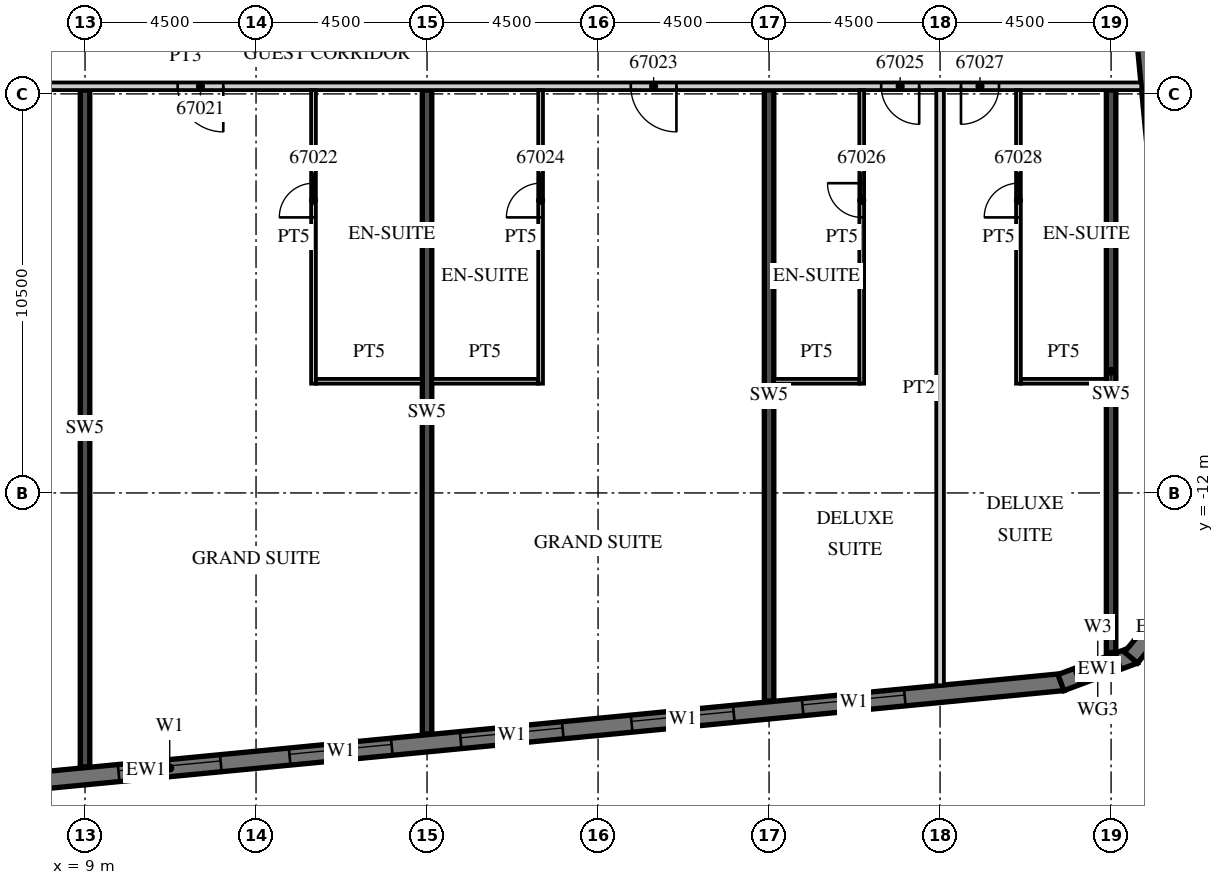
"""IFC4 building model, lengths in metres.
Left out: names, types, materials, properties, quantities, classifications, styles, units other than length and angle.
Written with IfcOpenShell. Run it as: python <this file> out.ifc"""

import sys

from ifc_helpers import new_model, si_unit, direction, frame, frame_2d, origin, place, context, subcontext, project, spatial, polyline, rectangle, outline, extrude, element, fill, save


model = new_model("IFC4")
c1 = context("Model", 3, precision=1e-05, world=origin(), true_north=direction((0.0, 1.0)))
c2 = subcontext(c1, "Body", "Model", "MODEL_VIEW")
j1 = project(units=[si_unit("LENGTHUNIT", "METRE"), si_unit("PLANEANGLEUNIT", "RADIAN")], contexts=[c1])
p1 = place(None, origin())
s1 = spatial("IfcSite", under=j1, at=p1, CompositionType="ELEMENT")
p2 = place(p1, origin())
s2 = spatial("IfcBuilding", under=s1, at=p2, CompositionType="ELEMENT")
p3 = place(p2, frame((0.0, 0.0, 271.8)))
s3 = spatial("IfcBuildingStorey", under=s2, at=p3, CompositionType="ELEMENT", Elevation=271.8)
p4 = place(p3, frame((9.0, -19.207, 0.0), z_axis=(0.0, 0.0, 1.0), x_axis=(0.0, 1.0, 0.0)))
e1 = element("IfcWall", 1, at=p4, inside=s3, PredefinedType="SHEAR", context=c2, shape_type="SweptSolid", body=[
    extrude(rectangle(XDim=17.807, YDim=0.25, at=frame_2d((8.904, 0.0))), origin(), (0.0, 0.0, 1.0), 3.3),
])
p5 = place(p3, frame((18.0, -18.341, 0.0), z_axis=(0.0, 0.0, 1.0), x_axis=(0.0, 1.0, 0.0)))
e2 = element("IfcWall", 2, at=p5, inside=s3, PredefinedType="SHEAR", context=c2, shape_type="SweptSolid", body=[
    extrude(rectangle(XDim=16.941, YDim=0.25, at=frame_2d((8.47, 0.0))), origin(), (0.0, 0.0, 1.0), 3.3),
])
p6 = place(p3, frame((27.0, -17.474, 0.0), z_axis=(0.0, 0.0, 1.0), x_axis=(0.0, 1.0, 0.0)))
e3 = element("IfcWall", 3, at=p6, inside=s3, PredefinedType="SHEAR", context=c2, shape_type="SweptSolid", body=[
    extrude(rectangle(XDim=16.074, YDim=0.25, at=frame_2d((8.037, 0.0))), origin(), (0.0, 0.0, 1.0), 3.3),
])
p7 = place(p3, frame((36.0, -16.199, 0.0), z_axis=(0.0, 0.0, 1.0), x_axis=(0.0, 1.0, 0.0)))
e4 = element("IfcWall", 4, at=p7, inside=s3, PredefinedType="SHEAR", context=c2, shape_type="SweptSolid", body=[
    extrude(rectangle(XDim=14.799, YDim=0.25, at=frame_2d((7.399, 0.0))), origin(), (0.0, 0.0, 1.0), 3.3),
])
p8 = place(p3, frame((-13.521, -21.624, 0.0), z_axis=(0.0, 0.0, 1.0), x_axis=(0.995396186218, 0.095845878695, 0.0)))
e5 = element("IfcWall", 5, at=p8, inside=s3, PredefinedType="SOLIDWALL", context=c2, shape_type="SweptSolid", body=[
    extrude(rectangle(XDim=48.481, YDim=0.45, at=frame_2d((24.241, 0.0))), origin(), (0.0, 0.0, 1.0), 3.02),
])
p9 = place(p8, frame((0.91, 0.0, 0.45)))
e6 = element("IfcOpeningElement", 6, at=p9, cuts=e5, PredefinedType="OPENING", context=c2, shape_type="SweptSolid", body=[
    extrude(rectangle(XDim=2.7, YDim=2.25, at=frame_2d((1.35, 1.125))), frame((0.0, 0.235, 0.0), z_axis=(0.0, -1.0, 0.0), x_axis=(1.0, 0.0, 0.0)), (0.0, 0.0, 1.0), 0.47),
])
p10 = place(p8, frame((5.431, 0.0, 0.45)))
e7 = element("IfcOpeningElement", 7, at=p10, cuts=e5, PredefinedType="OPENING", context=c2, shape_type="SweptSolid", body=[
    extrude(rectangle(XDim=2.7, YDim=2.25, at=frame_2d((1.35, 1.125))), frame((0.0, 0.235, 0.0), z_axis=(0.0, -1.0, 0.0), x_axis=(1.0, 0.0, 0.0)), (0.0, 0.0, 1.0), 0.47),
])
p11 = place(p8, frame((9.952, 0.0, 0.45)))
e8 = element("IfcOpeningElement", 8, at=p11, cuts=e5, PredefinedType="OPENING", context=c2, shape_type="SweptSolid", body=[
    extrude(rectangle(XDim=2.7, YDim=2.25, at=frame_2d((1.35, 1.125))), frame((0.0, 0.235, 0.0), z_axis=(0.0, -1.0, 0.0), x_axis=(1.0, 0.0, 0.0)), (0.0, 0.0, 1.0), 0.47),
])
p12 = place(p8, frame((14.473, 0.0, 0.45)))
e9 = element("IfcOpeningElement", 9, at=p12, cuts=e5, PredefinedType="OPENING", context=c2, shape_type="SweptSolid", body=[
    extrude(rectangle(XDim=2.7, YDim=2.25, at=frame_2d((1.35, 1.125))), frame((0.0, 0.235, 0.0), z_axis=(0.0, -1.0, 0.0), x_axis=(1.0, 0.0, 0.0)), (0.0, 0.0, 1.0), 0.47),
])
p13 = place(p8, frame((18.994, 0.0, 0.45)))
e10 = element("IfcOpeningElement", 10, at=p13, cuts=e5, PredefinedType="OPENING", context=c2, shape_type="SweptSolid", body=[
    extrude(rectangle(XDim=2.7, YDim=2.25, at=frame_2d((1.35, 1.125))), frame((0.0, 0.235, 0.0), z_axis=(0.0, -1.0, 0.0), x_axis=(1.0, 0.0, 0.0)), (0.0, 0.0, 1.0), 0.47),
])
p14 = place(p8, frame((23.514, 0.0, 0.45)))
e11 = element("IfcOpeningElement", 11, at=p14, cuts=e5, PredefinedType="OPENING", context=c2, shape_type="SweptSolid", body=[
    extrude(rectangle(XDim=2.7, YDim=2.25, at=frame_2d((1.35, 1.125))), frame((0.0, 0.235, 0.0), z_axis=(0.0, -1.0, 0.0), x_axis=(1.0, 0.0, 0.0)), (0.0, 0.0, 1.0), 0.47),
])
p15 = place(p8, frame((28.035, 0.0, 0.45)))
e12 = element("IfcOpeningElement", 12, at=p15, cuts=e5, PredefinedType="OPENING", context=c2, shape_type="SweptSolid", body=[
    extrude(rectangle(XDim=2.7, YDim=2.25, at=frame_2d((1.35, 1.125))), frame((0.0, 0.235, 0.0), z_axis=(0.0, -1.0, 0.0), x_axis=(1.0, 0.0, 0.0)), (0.0, 0.0, 1.0), 0.47),
])
p16 = place(p8, frame((32.556, 0.0, 0.45)))
e13 = element("IfcOpeningElement", 13, at=p16, cuts=e5, PredefinedType="OPENING", context=c2, shape_type="SweptSolid", body=[
    extrude(rectangle(XDim=2.7, YDim=2.25, at=frame_2d((1.35, 1.125))), frame((0.0, 0.235, 0.0), z_axis=(0.0, -1.0, 0.0), x_axis=(1.0, 0.0, 0.0)), (0.0, 0.0, 1.0), 0.47),
])
p17 = place(p8, frame((37.077, 0.0, 0.45)))
e14 = element("IfcOpeningElement", 14, at=p17, cuts=e5, PredefinedType="OPENING", context=c2, shape_type="SweptSolid", body=[
    extrude(rectangle(XDim=2.7, YDim=2.25, at=frame_2d((1.35, 1.125))), frame((0.0, 0.235, 0.0), z_axis=(0.0, -1.0, 0.0), x_axis=(1.0, 0.0, 0.0)), (0.0, 0.0, 1.0), 0.47),
])
p18 = place(p8, frame((41.598, 0.0, 0.45)))
e15 = element("IfcOpeningElement", 15, at=p18, cuts=e5, PredefinedType="OPENING", context=c2, shape_type="SweptSolid", body=[
    extrude(rectangle(XDim=2.7, YDim=2.25, at=frame_2d((1.35, 1.125))), frame((0.0, 0.235, 0.0), z_axis=(0.0, -1.0, 0.0), x_axis=(1.0, 0.0, 0.0)), (0.0, 0.0, 1.0), 0.47),
])
p19 = place(p3, frame((34.679, -16.99, 0.0), z_axis=(0.0, 0.0, 1.0), x_axis=(0.936677599948, 0.350192909346, 0.0)))
e16 = element("IfcWall", 16, at=p19, inside=s3, PredefinedType="SOLIDWALL", context=c2, shape_type="SweptSolid", body=[
    extrude(outline(polyline([(0.0, -0.225), (2.071, -0.225), (1.95, 0.225), (0.121, 0.225), (0.0, -0.225)])), origin(), (0.0, 0.0, 1.0), 3.02),
])
p20 = place(p19, frame((0.435, 0.0, 0.45)))
e17 = element("IfcOpeningElement", 17, at=p20, cuts=e16, PredefinedType="OPENING", context=c2, shape_type="SweptSolid", body=[
    extrude(rectangle(XDim=1.2, YDim=2.25, at=frame_2d((0.6, 1.125))), frame((0.0, 0.235, 0.0), z_axis=(0.0, -1.0, 0.0), x_axis=(1.0, 0.0, 0.0)), (0.0, 0.0, 1.0), 0.47),
])
p21 = place(p3, frame((36.524, -16.333, 0.0), z_axis=(0.0, 0.0, 1.0), x_axis=(0.636046112757, 0.771651049663, 0.0)))
e18 = element("IfcWall", 18, at=p21, inside=s3, PredefinedType="SOLIDWALL", context=c2, shape_type="SweptSolid", body=[
    extrude(outline(polyline([(0.0, -0.225), (2.071, -0.225), (1.95, 0.225), (0.121, 0.225), (0.0, -0.225)])), origin(), (0.0, 0.0, 1.0), 3.02),
])
p22 = place(p3, frame((38.132, -12.858, 0.0), z_axis=(0.0, 0.0, 1.0), x_axis=(-0.095847749461, 0.995396006082, 0.0)))
e19 = element("IfcWall", 19, at=p22, inside=s3, PredefinedType="SOLIDWALL", context=c2, shape_type="SweptSolid", body=[
    extrude(rectangle(XDim=32.0, YDim=0.45, at=frame_2d((16.0, 0.0))), origin(), (0.0, 0.0, 1.0), 3.02),
])
p23 = place(p3, frame((-13.5, -1.3, 0.0), z_axis=(0.0, 0.0, 1.0), x_axis=(1.0, 0.0, 0.0)))
e20 = element("IfcWall", 20, at=p23, inside=s3, PredefinedType="PARTITIONING", context=c2, shape_type="SweptSolid", body=[
    extrude(rectangle(XDim=50.293, YDim=0.2, at=frame_2d((25.146, 0.0))), origin(), (0.0, 0.0, 1.0), 3.02),
])
p24 = place(p23, frame((0.575, 0.0, 0.0)))
e21 = element("IfcOpeningElement", 21, at=p24, cuts=e20, PredefinedType="OPENING", context=c2, shape_type="SweptSolid", body=[
    extrude(rectangle(XDim=1.0, YDim=2.1, at=frame_2d((0.5, 1.05))), frame((0.0, 0.11, 0.0), z_axis=(0.0, -1.0, 0.0), x_axis=(1.0, 0.0, 0.0)), (0.0, 0.0, 1.0), 0.22),
])
p25 = place(p23, frame((6.938, 0.0, 0.0)))
e22 = element("IfcOpeningElement", 22, at=p25, cuts=e20, PredefinedType="OPENING", context=c2, shape_type="SweptSolid", body=[
    extrude(rectangle(XDim=1.2, YDim=2.1, at=frame_2d((0.6, 1.05))), frame((0.0, 0.11, 0.0), z_axis=(0.0, -1.0, 0.0), x_axis=(1.0, 0.0, 0.0)), (0.0, 0.0, 1.0), 0.22),
])
p26 = place(p23, frame((18.862, 0.0, 0.0)))
e23 = element("IfcOpeningElement", 23, at=p26, cuts=e20, PredefinedType="OPENING", context=c2, shape_type="SweptSolid", body=[
    extrude(rectangle(XDim=1.2, YDim=2.1, at=frame_2d((0.6, 1.05))), frame((0.0, 0.11, 0.0), z_axis=(0.0, -1.0, 0.0), x_axis=(1.0, 0.0, 0.0)), (0.0, 0.0, 1.0), 0.22),
])
p27 = place(p23, frame((24.938, 0.0, 0.0)))
e24 = element("IfcOpeningElement", 24, at=p27, cuts=e20, PredefinedType="OPENING", context=c2, shape_type="SweptSolid", body=[
    extrude(rectangle(XDim=1.2, YDim=2.1, at=frame_2d((0.6, 1.05))), frame((0.0, 0.11, 0.0), z_axis=(0.0, -1.0, 0.0), x_axis=(1.0, 0.0, 0.0)), (0.0, 0.0, 1.0), 0.22),
])
p28 = place(p23, frame((36.862, 0.0, 0.0)))
e25 = element("IfcOpeningElement", 25, at=p28, cuts=e20, PredefinedType="OPENING", context=c2, shape_type="SweptSolid", body=[
    extrude(rectangle(XDim=1.2, YDim=2.1, at=frame_2d((0.6, 1.05))), frame((0.0, 0.11, 0.0), z_axis=(0.0, -1.0, 0.0), x_axis=(1.0, 0.0, 0.0)), (0.0, 0.0, 1.0), 0.22),
])
p29 = place(p23, frame((43.45, 0.0, 0.0)))
e26 = element("IfcOpeningElement", 26, at=p29, cuts=e20, PredefinedType="OPENING", context=c2, shape_type="SweptSolid", body=[
    extrude(rectangle(XDim=1.0, YDim=2.1, at=frame_2d((0.5, 1.05))), frame((0.0, 0.11, 0.0), z_axis=(0.0, -1.0, 0.0), x_axis=(1.0, 0.0, 0.0)), (0.0, 0.0, 1.0), 0.22),
])
p30 = place(p23, frame((45.55, 0.0, 0.0)))
e27 = element("IfcOpeningElement", 27, at=p30, cuts=e20, PredefinedType="OPENING", context=c2, shape_type="SweptSolid", body=[
    extrude(rectangle(XDim=1.0, YDim=2.1, at=frame_2d((0.5, 1.05))), frame((0.0, 0.11, 0.0), z_axis=(0.0, -1.0, 0.0), x_axis=(1.0, 0.0, 0.0)), (0.0, 0.0, 1.0), 0.22),
])
p31 = place(p3, frame((15.012, -9.125, 0.0), z_axis=(0.0, 0.0, 1.0), x_axis=(0.0, 1.0, 0.0)))
e28 = element("IfcWall", 28, at=p31, inside=s3, PredefinedType="PARTITIONING", context=c2, shape_type="SweptSolid", body=[
    extrude(rectangle(XDim=7.725, YDim=0.125, at=frame_2d((3.863, 0.0))), origin(), (0.0, 0.0, 1.0), 3.02),
])
p32 = place(p31, frame((4.375, 0.0, 0.0)))
e29 = element("IfcOpeningElement", 29, at=p32, cuts=e28, PredefinedType="OPENING", context=c2, shape_type="SweptSolid", body=[
    extrude(rectangle(XDim=0.9, YDim=2.1, at=frame_2d((0.45, 1.05))), frame((0.0, 0.073, 0.0), z_axis=(0.0, -1.0, 0.0), x_axis=(1.0, 0.0, 0.0)), (0.0, 0.0, 1.0), 0.145),
])
p33 = place(p3, frame((15.075, -9.062, 0.0), z_axis=(0.0, 0.0, 1.0), x_axis=(1.0, 0.0, 0.0)))
e30 = element("IfcWall", 30, at=p33, inside=s3, PredefinedType="PARTITIONING", context=c2, shape_type="SweptSolid", body=[
    extrude(rectangle(XDim=2.8, YDim=0.125, at=frame_2d((1.4, 0.0))), origin(), (0.0, 0.0, 1.0), 3.02),
])
p34 = place(p3, frame((20.988, -9.125, 0.0), z_axis=(0.0, 0.0, 1.0), x_axis=(0.0, 1.0, 0.0)))
e31 = element("IfcWall", 31, at=p34, inside=s3, PredefinedType="PARTITIONING", context=c2, shape_type="SweptSolid", body=[
    extrude(rectangle(XDim=7.725, YDim=0.125, at=frame_2d((3.863, 0.0))), origin(), (0.0, 0.0, 1.0), 3.02),
])
p35 = place(p34, frame((4.375, 0.0, 0.0)))
e32 = element("IfcOpeningElement", 32, at=p35, cuts=e31, PredefinedType="OPENING", context=c2, shape_type="SweptSolid", body=[
    extrude(rectangle(XDim=0.9, YDim=2.1, at=frame_2d((0.45, 1.05))), frame((0.0, 0.073, 0.0), z_axis=(0.0, -1.0, 0.0), x_axis=(1.0, 0.0, 0.0)), (0.0, 0.0, 1.0), 0.145),
])
p36 = place(p3, frame((18.125, -9.062, 0.0), z_axis=(0.0, 0.0, 1.0), x_axis=(1.0, 0.0, 0.0)))
e33 = element("IfcWall", 33, at=p36, inside=s3, PredefinedType="PARTITIONING", context=c2, shape_type="SweptSolid", body=[
    extrude(rectangle(XDim=2.8, YDim=0.125, at=frame_2d((1.4, 0.0))), origin(), (0.0, 0.0, 1.0), 3.02),
])
p37 = place(p3, frame((31.5, -17.063, 0.0), z_axis=(0.0, 0.0, 1.0), x_axis=(0.0, 1.0, 0.0)))
e34 = element("IfcWall", 34, at=p37, inside=s3, PredefinedType="PARTITIONING", context=c2, shape_type="SweptSolid", body=[
    extrude(rectangle(XDim=15.663, YDim=0.2, at=frame_2d((7.832, 0.0))), origin(), (0.0, 0.0, 1.0), 3.02),
])
p38 = place(p3, frame((29.438, -9.125, 0.0), z_axis=(0.0, 0.0, 1.0), x_axis=(0.0, 1.0, 0.0)))
e35 = element("IfcWall", 35, at=p38, inside=s3, PredefinedType="PARTITIONING", context=c2, shape_type="SweptSolid", body=[
    extrude(rectangle(XDim=7.725, YDim=0.125, at=frame_2d((3.863, 0.0))), origin(), (0.0, 0.0, 1.0), 3.02),
])
p39 = place(p38, frame((4.375, 0.0, 0.0)))
e36 = element("IfcOpeningElement", 36, at=p39, cuts=e35, PredefinedType="OPENING", context=c2, shape_type="SweptSolid", body=[
    extrude(rectangle(XDim=0.9, YDim=2.1, at=frame_2d((0.45, 1.05))), frame((0.0, 0.073, 0.0), z_axis=(0.0, -1.0, 0.0), x_axis=(1.0, 0.0, 0.0)), (0.0, 0.0, 1.0), 0.145),
])
p40 = place(p3, frame((27.125, -9.062, 0.0), z_axis=(0.0, 0.0, 1.0), x_axis=(1.0, 0.0, 0.0)))
e37 = element("IfcWall", 37, at=p40, inside=s3, PredefinedType="PARTITIONING", context=c2, shape_type="SweptSolid", body=[
    extrude(rectangle(XDim=2.25, YDim=0.125, at=frame_2d((1.125, 0.0))), origin(), (0.0, 0.0, 1.0), 3.02),
])
p41 = place(p3, frame((33.562, -9.125, 0.0), z_axis=(0.0, 0.0, 1.0), x_axis=(0.0, 1.0, 0.0)))
e38 = element("IfcWall", 38, at=p41, inside=s3, PredefinedType="PARTITIONING", context=c2, shape_type="SweptSolid", body=[
    extrude(rectangle(XDim=7.725, YDim=0.125, at=frame_2d((3.863, 0.0))), origin(), (0.0, 0.0, 1.0), 3.02),
])
p42 = place(p41, frame((4.375, 0.0, 0.0)))
e39 = element("IfcOpeningElement", 39, at=p42, cuts=e38, PredefinedType="OPENING", context=c2, shape_type="SweptSolid", body=[
    extrude(rectangle(XDim=0.9, YDim=2.1, at=frame_2d((0.45, 1.05))), frame((0.0, 0.073, 0.0), z_axis=(0.0, -1.0, 0.0), x_axis=(1.0, 0.0, 0.0)), (0.0, 0.0, 1.0), 0.145),
])
p43 = place(p3, frame((33.625, -9.062, 0.0), z_axis=(0.0, 0.0, 1.0), x_axis=(1.0, 0.0, 0.0)))
e40 = element("IfcWall", 40, at=p43, inside=s3, PredefinedType="PARTITIONING", context=c2, shape_type="SweptSolid", body=[
    extrude(rectangle(XDim=2.25, YDim=0.125, at=frame_2d((1.125, 0.0))), origin(), (0.0, 0.0, 1.0), 3.02),
])
p44 = place(p14, origin())
e41 = element("IfcWindow", 41, at=p44, inside=s3, PartitioningType="SINGLE_PANEL", PredefinedType="WINDOW", context=c2, shape_type="SweptSolid", body=[
    extrude(rectangle(XDim=2.7, YDim=2.25, at=frame_2d((1.35, 1.125))), frame((0.0, 0.09, 0.0), z_axis=(0.0, -1.0, 0.0), x_axis=(1.0, 0.0, 0.0)), (0.0, 0.0, 1.0), 0.06),
])
fill(e11, e41)
p45 = place(p15, origin())
e42 = element("IfcWindow", 42, at=p45, inside=s3, PartitioningType="SINGLE_PANEL", PredefinedType="WINDOW", context=c2, shape_type="SweptSolid", body=[
    extrude(rectangle(XDim=2.7, YDim=2.25, at=frame_2d((1.35, 1.125))), frame((0.0, 0.09, 0.0), z_axis=(0.0, -1.0, 0.0), x_axis=(1.0, 0.0, 0.0)), (0.0, 0.0, 1.0), 0.06),
])
fill(e12, e42)
p46 = place(p16, origin())
e43 = element("IfcWindow", 43, at=p46, inside=s3, PartitioningType="SINGLE_PANEL", PredefinedType="WINDOW", context=c2, shape_type="SweptSolid", body=[
    extrude(rectangle(XDim=2.7, YDim=2.25, at=frame_2d((1.35, 1.125))), frame((0.0, 0.09, 0.0), z_axis=(0.0, -1.0, 0.0), x_axis=(1.0, 0.0, 0.0)), (0.0, 0.0, 1.0), 0.06),
])
fill(e13, e43)
p47 = place(p17, origin())
e44 = element("IfcWindow", 44, at=p47, inside=s3, PartitioningType="SINGLE_PANEL", PredefinedType="WINDOW", context=c2, shape_type="SweptSolid", body=[
    extrude(rectangle(XDim=2.7, YDim=2.25, at=frame_2d((1.35, 1.125))), frame((0.0, 0.09, 0.0), z_axis=(0.0, -1.0, 0.0), x_axis=(1.0, 0.0, 0.0)), (0.0, 0.0, 1.0), 0.06),
])
fill(e14, e44)
p48 = place(p18, origin())
e45 = element("IfcWindow", 45, at=p48, inside=s3, PartitioningType="SINGLE_PANEL", PredefinedType="WINDOW", context=c2, shape_type="SweptSolid", body=[
    extrude(rectangle(XDim=2.7, YDim=2.25, at=frame_2d((1.35, 1.125))), frame((0.0, 0.09, 0.0), z_axis=(0.0, -1.0, 0.0), x_axis=(1.0, 0.0, 0.0)), (0.0, 0.0, 1.0), 0.06),
])
fill(e15, e45)
p49 = place(p20, origin())
e46 = element("IfcWindow", 46, at=p49, inside=s3, PartitioningType="SINGLE_PANEL", PredefinedType="WINDOW", context=c2, shape_type="SweptSolid", body=[
    extrude(rectangle(XDim=1.2, YDim=2.25, at=frame_2d((0.6, 1.125))), frame((0.0, 0.09, 0.0), z_axis=(0.0, -1.0, 0.0), x_axis=(1.0, 0.0, 0.0)), (0.0, 0.0, 1.0), 0.06),
])
fill(e17, e46)
p50 = place(p27, origin())
e47 = element("IfcDoor", 47, at=p50, inside=s3, OperationType="SINGLE_SWING_RIGHT", PredefinedType="DOOR", context=c2, shape_type="SweptSolid", body=[
    extrude(rectangle(XDim=1.2, YDim=2.1, at=frame_2d((0.6, 1.05))), frame((0.0, 0.025, 0.0), z_axis=(0.0, -1.0, 0.0), x_axis=(1.0, 0.0, 0.0)), (0.0, 0.0, 1.0), 0.05),
])
fill(e24, e47)
p51 = place(p32, origin())
e48 = element("IfcDoor", 48, at=p51, inside=s3, OperationType="SINGLE_SWING_LEFT", PredefinedType="DOOR", context=c2, shape_type="SweptSolid", body=[
    extrude(rectangle(XDim=0.9, YDim=2.1, at=frame_2d((0.45, 1.05))), frame((0.0, 0.025, 0.0), z_axis=(0.0, -1.0, 0.0), x_axis=(1.0, 0.0, 0.0)), (0.0, 0.0, 1.0), 0.05),
])
fill(e29, e48)
p52 = place(p28, origin())
e49 = element("IfcDoor", 49, at=p52, inside=s3, OperationType="SINGLE_SWING_RIGHT", PredefinedType="DOOR", context=c2, shape_type="SweptSolid", body=[
    extrude(rectangle(XDim=1.2, YDim=2.1, at=frame_2d((0.6, 1.05))), frame((0.0, 0.025, 0.0), z_axis=(0.0, -1.0, 0.0), x_axis=(1.0, 0.0, 0.0)), (0.0, 0.0, 1.0), 0.05),
])
fill(e25, e49)
p53 = place(p35, origin())
e50 = element("IfcDoor", 50, at=p53, inside=s3, OperationType="SINGLE_SWING_LEFT", PredefinedType="DOOR", context=c2, shape_type="SweptSolid", body=[
    extrude(rectangle(XDim=0.9, YDim=2.1, at=frame_2d((0.45, 1.05))), frame((0.0, 0.025, 0.0), z_axis=(0.0, -1.0, 0.0), x_axis=(1.0, 0.0, 0.0)), (0.0, 0.0, 1.0), 0.05),
])
fill(e32, e50)
p54 = place(p29, origin())
e51 = element("IfcDoor", 51, at=p54, inside=s3, OperationType="SINGLE_SWING_RIGHT", PredefinedType="DOOR", context=c2, shape_type="SweptSolid", body=[
    extrude(rectangle(XDim=1.0, YDim=2.1, at=frame_2d((0.5, 1.05))), frame((0.0, 0.025, 0.0), z_axis=(0.0, -1.0, 0.0), x_axis=(1.0, 0.0, 0.0)), (0.0, 0.0, 1.0), 0.05),
])
fill(e26, e51)
p55 = place(p39, origin())
e52 = element("IfcDoor", 52, at=p55, inside=s3, OperationType="SINGLE_SWING_RIGHT", PredefinedType="DOOR", context=c2, shape_type="SweptSolid", body=[
    extrude(rectangle(XDim=0.9, YDim=2.1, at=frame_2d((0.45, 1.05))), frame((0.0, 0.025, 0.0), z_axis=(0.0, -1.0, 0.0), x_axis=(1.0, 0.0, 0.0)), (0.0, 0.0, 1.0), 0.05),
])
fill(e36, e52)
p56 = place(p30, origin())
e53 = element("IfcDoor", 53, at=p56, inside=s3, OperationType="SINGLE_SWING_LEFT", PredefinedType="DOOR", context=c2, shape_type="SweptSolid", body=[
    extrude(rectangle(XDim=1.0, YDim=2.1, at=frame_2d((0.5, 1.05))), frame((0.0, 0.025, 0.0), z_axis=(0.0, -1.0, 0.0), x_axis=(1.0, 0.0, 0.0)), (0.0, 0.0, 1.0), 0.05),
])
fill(e27, e53)
p57 = place(p42, origin())
e54 = element("IfcDoor", 54, at=p57, inside=s3, OperationType="SINGLE_SWING_LEFT", PredefinedType="DOOR", context=c2, shape_type="SweptSolid", body=[
    extrude(rectangle(XDim=0.9, YDim=2.1, at=frame_2d((0.45, 1.05))), frame((0.0, 0.025, 0.0), z_axis=(0.0, -1.0, 0.0), x_axis=(1.0, 0.0, 0.0)), (0.0, 0.0, 1.0), 0.05),
])
fill(e39, e54)
save(model, sys.argv[1])
